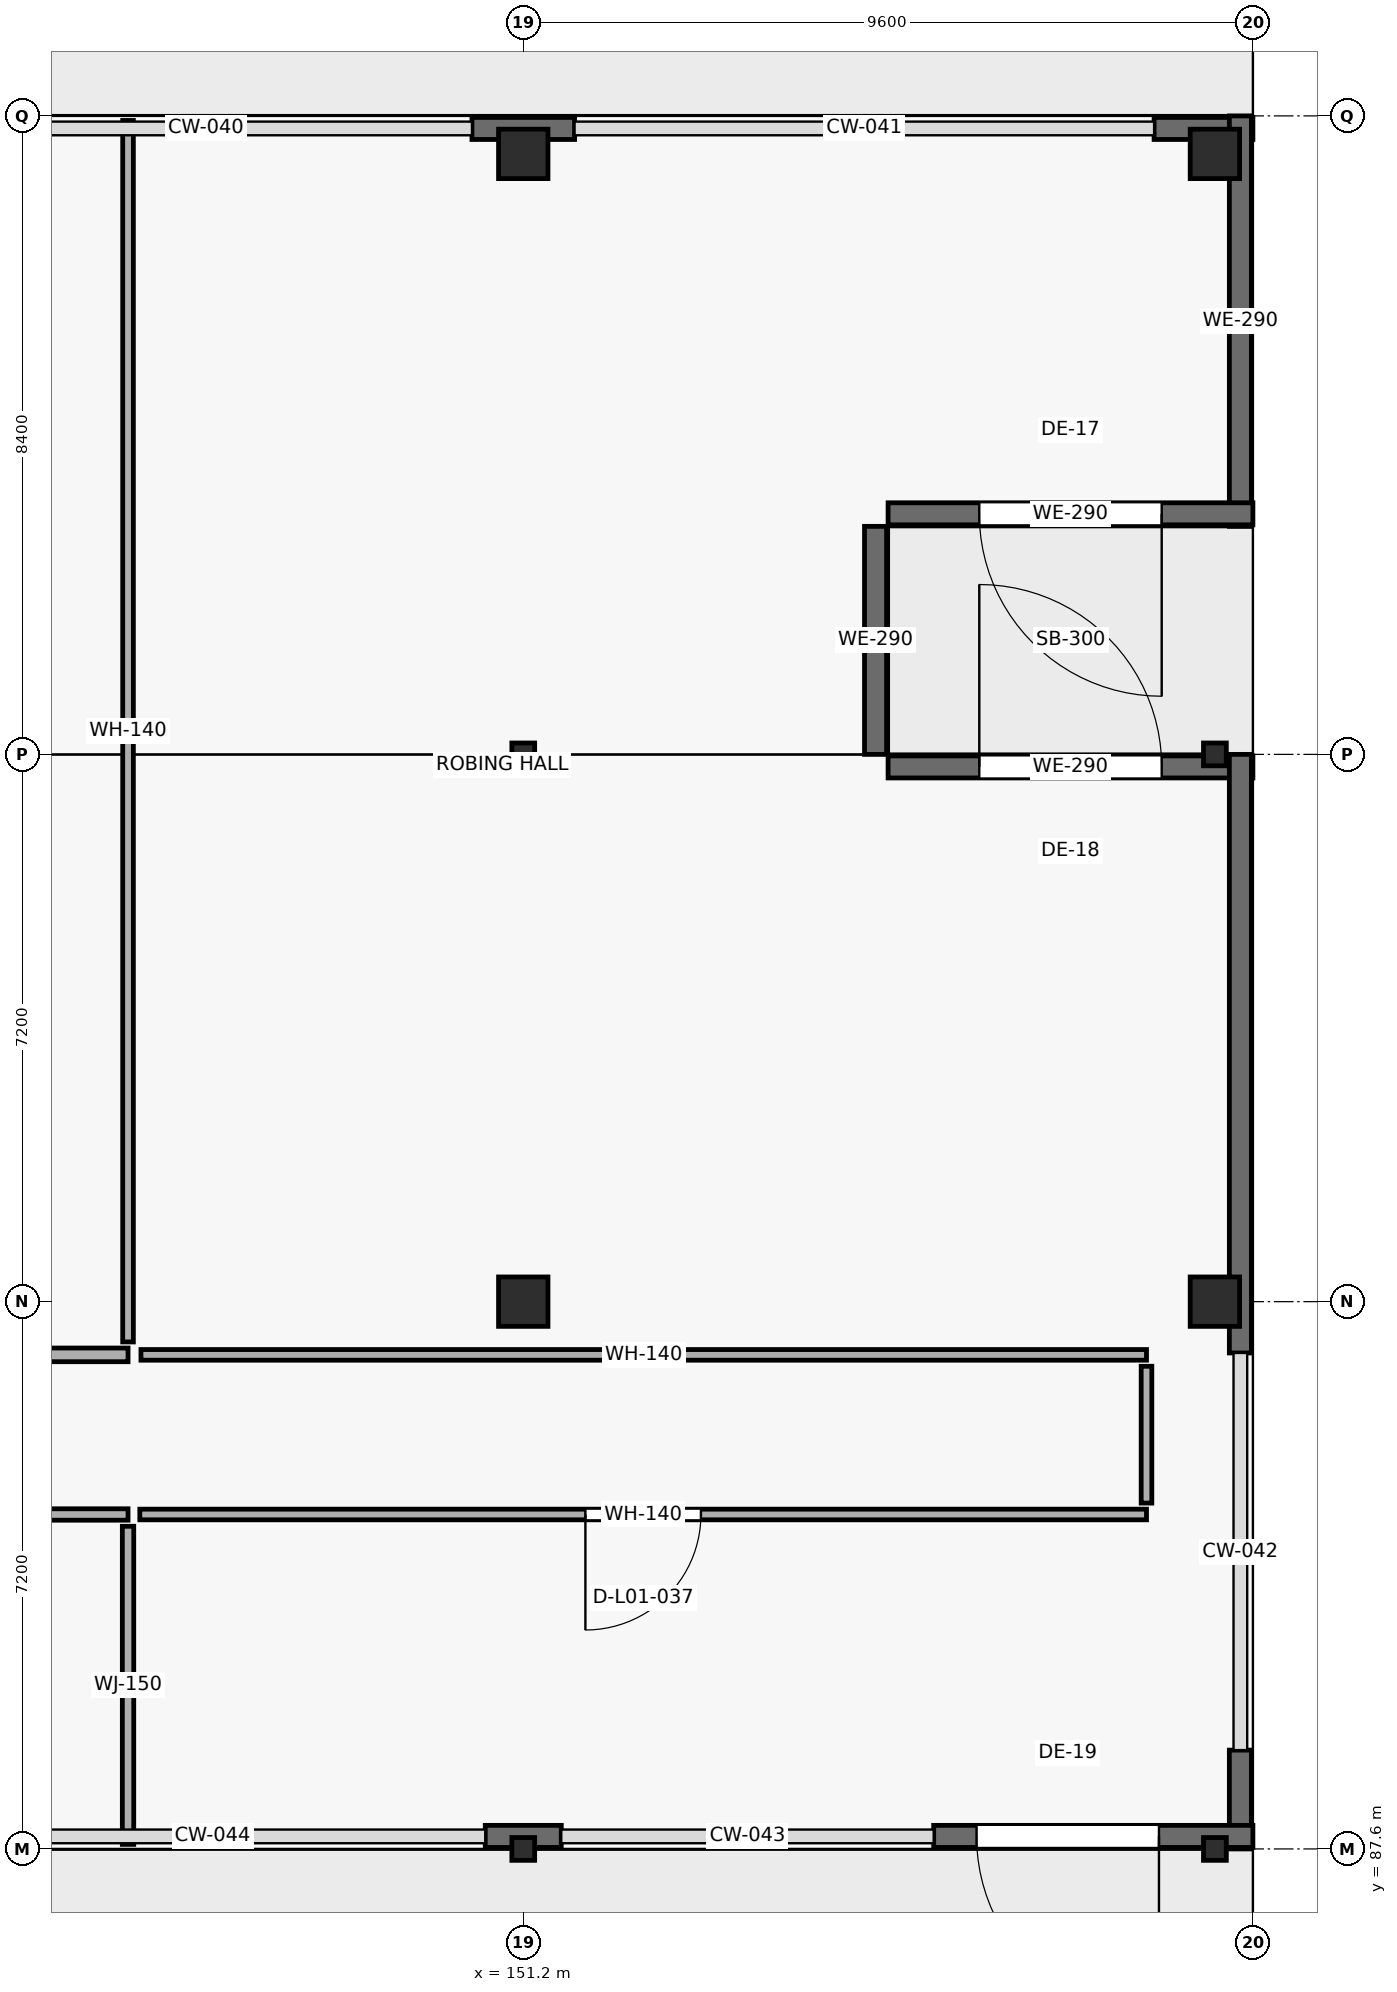
"""IFC4 building model, lengths in metres.
Left out: names, types, materials, properties, quantities, classifications, styles, units other than length and angle.
Written with IfcOpenShell. Run it as: python <this file> out.ifc"""

import sys

from ifc_helpers import new_model, si_unit, direction, frame, frame_2d, origin, origin_2d, place, context, subcontext, project, spatial, rectangle, hollow_rectangle, extrude, element, fill, save


model = new_model("IFC4")
c1 = context("Model", 3, precision=1e-05, world=origin(), true_north=direction((0.0, 1.0)))
c2 = subcontext(c1, "Body", "Model", "MODEL_VIEW")
j1 = project(units=[si_unit("LENGTHUNIT", "METRE"), si_unit("PLANEANGLEUNIT", "RADIAN")], contexts=[c1])
p1 = place(None, origin())
s1 = spatial("IfcSite", under=j1, at=p1, CompositionType="ELEMENT")
p2 = place(p1, origin())
s2 = spatial("IfcBuilding", under=s1, at=p2, CompositionType="ELEMENT")
p3 = place(p2, origin())
s3 = spatial("IfcBuildingStorey", under=s2, at=p3, CompositionType="ELEMENT", Elevation=0.0)
p4 = place(p3, frame((151.2, 87.6, 0.0), z_axis=(0.0, 0.0, 1.0), x_axis=(1.0, 0.0, 0.0)))
e1 = element("IfcColumn", 1, at=p4, inside=s3, PredefinedType="COLUMN", context=c2, shape_type="SweptSolid", body=[
    extrude(hollow_rectangle(XDim=0.3, YDim=0.3, WallThickness=0.012, at=origin_2d()), origin(), (0.0, 0.0, 1.0), 5.4),
])
p5 = place(p3, frame((151.2, 94.8, 0.0), z_axis=(0.0, 0.0, 1.0), x_axis=(1.0, 0.0, 0.0)))
e2 = element("IfcColumn", 2, at=p5, inside=s3, PredefinedType="COLUMN", context=c2, shape_type="SweptSolid", body=[
    extrude(rectangle(XDim=0.65, YDim=0.65, at=origin_2d()), origin(), (0.0, 0.0, 1.0), 5.4),
])
p6 = place(p3, frame((151.2, 102.0, 0.0), z_axis=(0.0, 0.0, 1.0), x_axis=(1.0, 0.0, 0.0)))
e3 = element("IfcColumn", 3, at=p6, inside=s3, PredefinedType="COLUMN", context=c2, shape_type="SweptSolid", body=[
    extrude(hollow_rectangle(XDim=0.3, YDim=0.3, WallThickness=0.012, at=origin_2d()), origin(), (0.0, 0.0, 1.0), 5.4),
])
p7 = place(p3, frame((151.2, 109.9, 0.0), z_axis=(0.0, 0.0, 1.0), x_axis=(1.0, 0.0, 0.0)))
e4 = element("IfcColumn", 4, at=p7, inside=s3, PredefinedType="COLUMN", context=c2, shape_type="SweptSolid", body=[
    extrude(rectangle(XDim=0.65, YDim=0.65, at=origin_2d()), origin(), (0.0, 0.0, 1.0), 5.4),
])
p8 = place(p3, frame((160.3, 87.6, 0.0), z_axis=(0.0, 0.0, 1.0), x_axis=(1.0, 0.0, 0.0)))
e5 = element("IfcColumn", 5, at=p8, inside=s3, PredefinedType="COLUMN", context=c2, shape_type="SweptSolid", body=[
    extrude(hollow_rectangle(XDim=0.3, YDim=0.3, WallThickness=0.012, at=origin_2d()), origin(), (0.0, 0.0, 1.0), 5.4),
])
p9 = place(p3, frame((160.3, 94.8, 0.0), z_axis=(0.0, 0.0, 1.0), x_axis=(1.0, 0.0, 0.0)))
e6 = element("IfcColumn", 6, at=p9, inside=s3, PredefinedType="COLUMN", context=c2, shape_type="SweptSolid", body=[
    extrude(rectangle(XDim=0.65, YDim=0.65, at=origin_2d()), origin(), (0.0, 0.0, 1.0), 5.4),
])
p10 = place(p3, frame((160.3, 102.0, 0.0), z_axis=(0.0, 0.0, 1.0), x_axis=(1.0, 0.0, 0.0)))
e7 = element("IfcColumn", 7, at=p10, inside=s3, PredefinedType="COLUMN", context=c2, shape_type="SweptSolid", body=[
    extrude(hollow_rectangle(XDim=0.3, YDim=0.3, WallThickness=0.012, at=origin_2d()), origin(), (0.0, 0.0, 1.0), 5.4),
])
p11 = place(p3, frame((160.3, 109.9, 0.0), z_axis=(0.0, 0.0, 1.0), x_axis=(1.0, 0.0, 0.0)))
e8 = element("IfcColumn", 8, at=p11, inside=s3, PredefinedType="COLUMN", context=c2, shape_type="SweptSolid", body=[
    extrude(rectangle(XDim=0.65, YDim=0.65, at=origin_2d()), origin(), (0.0, 0.0, 1.0), 5.4),
])
p12 = place(p3, frame((150.525, 110.235, 0.0), z_axis=(0.0, 0.0, 1.0), x_axis=(1.0, 0.0, 0.0)))
e9 = element("IfcWall", 9, at=p12, inside=s3, PredefinedType="SOLIDWALL", context=c2, shape_type="SweptSolid", body=[
    extrude(rectangle(XDim=1.35, YDim=0.29, at=frame_2d((0.675, 0.0))), origin(), (0.0, 0.0, 1.0), 5.12),
])
p13 = place(p3, frame((159.5, 110.235, 0.0), z_axis=(0.0, 0.0, 1.0), x_axis=(1.0, 0.0, 0.0)))
e10 = element("IfcWall", 10, at=p13, inside=s3, PredefinedType="SOLIDWALL", context=c2, shape_type="SweptSolid", body=[
    extrude(rectangle(XDim=1.3, YDim=0.29, at=frame_2d((0.65, 0.0))), origin(), (0.0, 0.0, 1.0), 5.12),
])
p14 = place(p3, frame((160.635, 110.4, 0.0), z_axis=(0.0, 0.0, 1.0), x_axis=(0.0, -1.0, 0.0)))
e11 = element("IfcWall", 11, at=p14, inside=s3, PredefinedType="SOLIDWALL", context=c2, shape_type="SweptSolid", body=[
    extrude(rectangle(XDim=5.4, YDim=0.29, at=frame_2d((2.7, 0.0))), origin(), (0.0, 0.0, 1.0), 5.12),
])
p15 = place(p3, frame((160.8, 105.165, 0.0), z_axis=(0.0, 0.0, 1.0), x_axis=(-1.0, 0.0, 0.0)))
e12 = element("IfcWall", 12, at=p15, inside=s3, PredefinedType="SOLIDWALL", context=c2, shape_type="SweptSolid", body=[
    extrude(rectangle(XDim=4.8, YDim=0.29, at=frame_2d((2.4, 0.0))), origin(), (0.0, 0.0, 1.0), 5.12),
])
p16 = place(p15, frame((1.2, 0.0, 0.0)))
e13 = element("IfcOpeningElement", 13, at=p16, cuts=e12, PredefinedType="OPENING", context=c2, shape_type="SweptSolid", body=[
    extrude(rectangle(XDim=2.4, YDim=2.7, at=frame_2d((1.2, 1.35))), frame((0.0, 0.155, 0.0), z_axis=(0.0, -1.0, 0.0), x_axis=(1.0, 0.0, 0.0)), (0.0, 0.0, 1.0), 0.31),
])
p17 = place(p3, frame((155.835, 105.0, 0.0), z_axis=(0.0, 0.0, 1.0), x_axis=(0.0, -1.0, 0.0)))
e14 = element("IfcWall", 14, at=p17, inside=s3, PredefinedType="SOLIDWALL", context=c2, shape_type="SweptSolid", body=[
    extrude(rectangle(XDim=3.0, YDim=0.29, at=frame_2d((1.5, 0.0))), origin(), (0.0, 0.0, 1.0), 5.12),
])
p18 = place(p3, frame((156.0, 101.835, 0.0), z_axis=(0.0, 0.0, 1.0), x_axis=(1.0, 0.0, 0.0)))
e15 = element("IfcWall", 15, at=p18, inside=s3, PredefinedType="SOLIDWALL", context=c2, shape_type="SweptSolid", body=[
    extrude(rectangle(XDim=4.8, YDim=0.29, at=frame_2d((2.4, 0.0))), origin(), (0.0, 0.0, 1.0), 5.12),
])
p19 = place(p18, frame((1.2, 0.0, 0.0)))
e16 = element("IfcOpeningElement", 16, at=p19, cuts=e15, PredefinedType="OPENING", context=c2, shape_type="SweptSolid", body=[
    extrude(rectangle(XDim=2.4, YDim=2.7, at=frame_2d((1.2, 1.35))), frame((0.0, 0.155, 0.0), z_axis=(0.0, -1.0, 0.0), x_axis=(1.0, 0.0, 0.0)), (0.0, 0.0, 1.0), 0.31),
])
p20 = place(p3, frame((160.635, 102.0, 0.0), z_axis=(0.0, 0.0, 1.0), x_axis=(0.0, -1.0, 0.0)))
e17 = element("IfcWall", 17, at=p20, inside=s3, PredefinedType="SOLIDWALL", context=c2, shape_type="SweptSolid", body=[
    extrude(rectangle(XDim=7.875, YDim=0.29, at=frame_2d((3.938, 0.0))), origin(), (0.0, 0.0, 1.0), 5.12),
])
p21 = place(p3, frame((160.635, 88.9, 0.0), z_axis=(0.0, 0.0, 1.0), x_axis=(0.0, -1.0, 0.0)))
e18 = element("IfcWall", 18, at=p21, inside=s3, PredefinedType="SOLIDWALL", context=c2, shape_type="SweptSolid", body=[
    extrude(rectangle(XDim=1.3, YDim=0.29, at=frame_2d((0.65, 0.0))), origin(), (0.0, 0.0, 1.0), 5.12),
])
p22 = place(p3, frame((160.8, 87.765, 0.0), z_axis=(0.0, 0.0, 1.0), x_axis=(-1.0, 0.0, 0.0)))
e19 = element("IfcWall", 19, at=p22, inside=s3, PredefinedType="SOLIDWALL", context=c2, shape_type="SweptSolid", body=[
    extrude(rectangle(XDim=4.2, YDim=0.29, at=frame_2d((2.1, 0.0))), origin(), (0.0, 0.0, 1.0), 5.12),
])
p23 = place(p22, frame((1.236, 0.0, 0.0)))
e20 = element("IfcOpeningElement", 20, at=p23, cuts=e19, PredefinedType="OPENING", context=c2, shape_type="SweptSolid", body=[
    extrude(rectangle(XDim=2.4, YDim=2.7, at=frame_2d((1.2, 1.35))), frame((0.0, 0.155, 0.0), z_axis=(0.0, -1.0, 0.0), x_axis=(1.0, 0.0, 0.0)), (0.0, 0.0, 1.0), 0.31),
])
p24 = place(p3, frame((151.7, 87.765, 0.0), z_axis=(0.0, 0.0, 1.0), x_axis=(-1.0, 0.0, 0.0)))
e21 = element("IfcWall", 21, at=p24, inside=s3, PredefinedType="SOLIDWALL", context=c2, shape_type="SweptSolid", body=[
    extrude(rectangle(XDim=1.0, YDim=0.29, at=frame_2d((0.5, 0.0))), origin(), (0.0, 0.0, 1.0), 5.12),
])
p25 = place(p3, frame((128.2, 92.0, 0.0), z_axis=(0.0, 0.0, 1.0), x_axis=(1.0, 0.0, 0.0)))
e22 = element("IfcWall", 22, at=p25, inside=s3, PredefinedType="PARTITIONING", context=c2, shape_type="SweptSolid", body=[
    extrude(rectangle(XDim=17.8, YDim=0.15, at=frame_2d((8.9, 0.0))), origin(), (0.0, 0.0, 1.0), 5.12),
])
p26 = place(p25, frame((8.43, 0.0, 0.0)))
e23 = element("IfcOpeningElement", 23, at=p26, cuts=e22, PredefinedType="OPENING", context=c2, shape_type="SweptSolid", body=[
    extrude(rectangle(XDim=0.94, YDim=2.18, at=frame_2d((0.47, 1.09))), frame((0.0, 0.085, 0.0), z_axis=(0.0, -1.0, 0.0), x_axis=(1.0, 0.0, 0.0)), (0.0, 0.0, 1.0), 0.17),
])
p27 = place(p3, frame((146.0, 94.1, 0.0), z_axis=(0.0, 0.0, 1.0), x_axis=(-1.0, 0.0, 0.0)))
e24 = element("IfcWall", 24, at=p27, inside=s3, PredefinedType="PARTITIONING", context=c2, shape_type="SweptSolid", body=[
    extrude(rectangle(XDim=17.8, YDim=0.18, at=frame_2d((8.9, 0.0))), origin(), (0.0, 0.0, 1.0), 5.12),
])
p28 = place(p27, frame((5.624, 0.0, 0.0)))
e25 = element("IfcOpeningElement", 25, at=p28, cuts=e24, PredefinedType="OPENING", context=c2, shape_type="SweptSolid", body=[
    extrude(rectangle(XDim=2.28, YDim=2.75, at=frame_2d((1.14, 1.375))), frame((0.0, 0.1, 0.0), z_axis=(0.0, -1.0, 0.0), x_axis=(1.0, 0.0, 0.0)), (0.0, 0.0, 1.0), 0.2),
])
p29 = place(p3, frame((146.0, 94.27, 0.0), z_axis=(0.0, 0.0, 1.0), x_axis=(0.0, 1.0, 0.0)))
e26 = element("IfcWall", 26, at=p29, inside=s3, PredefinedType="PARTITIONING", context=c2, shape_type="SweptSolid", body=[
    extrude(rectangle(XDim=16.07, YDim=0.14, at=frame_2d((8.035, 0.0))), origin(), (0.0, 0.0, 1.0), 5.12),
])
p30 = place(p3, frame((146.155, 92.0, 0.0), z_axis=(0.0, 0.0, 1.0), x_axis=(1.0, 0.0, 0.0)))
e27 = element("IfcWall", 27, at=p30, inside=s3, PredefinedType="PARTITIONING", context=c2, shape_type="SweptSolid", body=[
    extrude(rectangle(XDim=13.245, YDim=0.14, at=frame_2d((6.623, 0.0))), origin(), (0.0, 0.0, 1.0), 5.12),
])
p31 = place(p30, frame((5.863, 0.0, 0.0)))
e28 = element("IfcOpeningElement", 28, at=p31, cuts=e27, PredefinedType="OPENING", context=c2, shape_type="SweptSolid", body=[
    extrude(rectangle(XDim=1.52, YDim=2.4, at=frame_2d((0.76, 1.2))), frame((0.0, 0.08, 0.0), z_axis=(0.0, -1.0, 0.0), x_axis=(1.0, 0.0, 0.0)), (0.0, 0.0, 1.0), 0.16),
])
p32 = place(p3, frame((159.4, 94.1, 0.0), z_axis=(0.0, 0.0, 1.0), x_axis=(-1.0, 0.0, 0.0)))
e29 = element("IfcWall", 29, at=p32, inside=s3, PredefinedType="PARTITIONING", context=c2, shape_type="SweptSolid", body=[
    extrude(rectangle(XDim=13.23, YDim=0.14, at=frame_2d((6.615, 0.0))), origin(), (0.0, 0.0, 1.0), 5.12),
])
p33 = place(p3, frame((146.0, 91.845, 0.0), z_axis=(0.0, 0.0, 1.0), x_axis=(0.0, -1.0, 0.0)))
e30 = element("IfcWall", 30, at=p33, inside=s3, PredefinedType="PARTITIONING", context=c2, shape_type="SweptSolid", body=[
    extrude(rectangle(XDim=4.185, YDim=0.15, at=frame_2d((2.093, 0.0))), origin(), (0.0, 0.0, 1.0), 5.12),
])
p34 = place(p3, frame((159.4, 92.15, 0.0), z_axis=(0.0, 0.0, 1.0), x_axis=(0.0, 1.0, 0.0)))
e31 = element("IfcWall", 31, at=p34, inside=s3, PredefinedType="PARTITIONING", context=c2, shape_type="SweptSolid", body=[
    extrude(rectangle(XDim=1.8, YDim=0.14, at=frame_2d((0.9, 0.0))), origin(), (0.0, 0.0, 1.0), 5.12),
])
p35 = place(p16, origin())
e32 = element("IfcDoor", 32, at=p35, inside=s3, OperationType="SINGLE_SWING_LEFT", PredefinedType="DOOR", context=c2, shape_type="SweptSolid", body=[
    extrude(rectangle(XDim=2.4, YDim=2.7, at=frame_2d((1.2, 1.35))), frame((0.0, 0.025, 0.0), z_axis=(0.0, -1.0, 0.0), x_axis=(1.0, 0.0, 0.0)), (0.0, 0.0, 1.0), 0.05),
])
fill(e13, e32)
p36 = place(p19, origin())
e33 = element("IfcDoor", 33, at=p36, inside=s3, OperationType="SINGLE_SWING_LEFT", PredefinedType="DOOR", context=c2, shape_type="SweptSolid", body=[
    extrude(rectangle(XDim=2.4, YDim=2.7, at=frame_2d((1.2, 1.35))), frame((0.0, 0.025, 0.0), z_axis=(0.0, -1.0, 0.0), x_axis=(1.0, 0.0, 0.0)), (0.0, 0.0, 1.0), 0.05),
])
fill(e16, e33)
p37 = place(p23, origin())
e34 = element("IfcDoor", 34, at=p37, inside=s3, OperationType="SINGLE_SWING_LEFT", PredefinedType="DOOR", context=c2, shape_type="SweptSolid", body=[
    extrude(rectangle(XDim=2.4, YDim=2.7, at=frame_2d((1.2, 1.35))), frame((0.0, 0.025, 0.0), z_axis=(0.0, -1.0, 0.0), x_axis=(1.0, 0.0, 0.0)), (0.0, 0.0, 1.0), 0.05),
])
fill(e20, e34)
p38 = place(p31, origin())
e35 = element("IfcDoor", 35, at=p38, inside=s3, OperationType="SINGLE_SWING_RIGHT", PredefinedType="DOOR", context=c2, shape_type="SweptSolid", body=[
    extrude(rectangle(XDim=1.52, YDim=2.4, at=frame_2d((0.76, 1.2))), frame((0.0, 0.025, 0.0), z_axis=(0.0, -1.0, 0.0), x_axis=(1.0, 0.0, 0.0)), (0.0, 0.0, 1.0), 0.05),
])
fill(e28, e35)
save(model, sys.argv[1])
